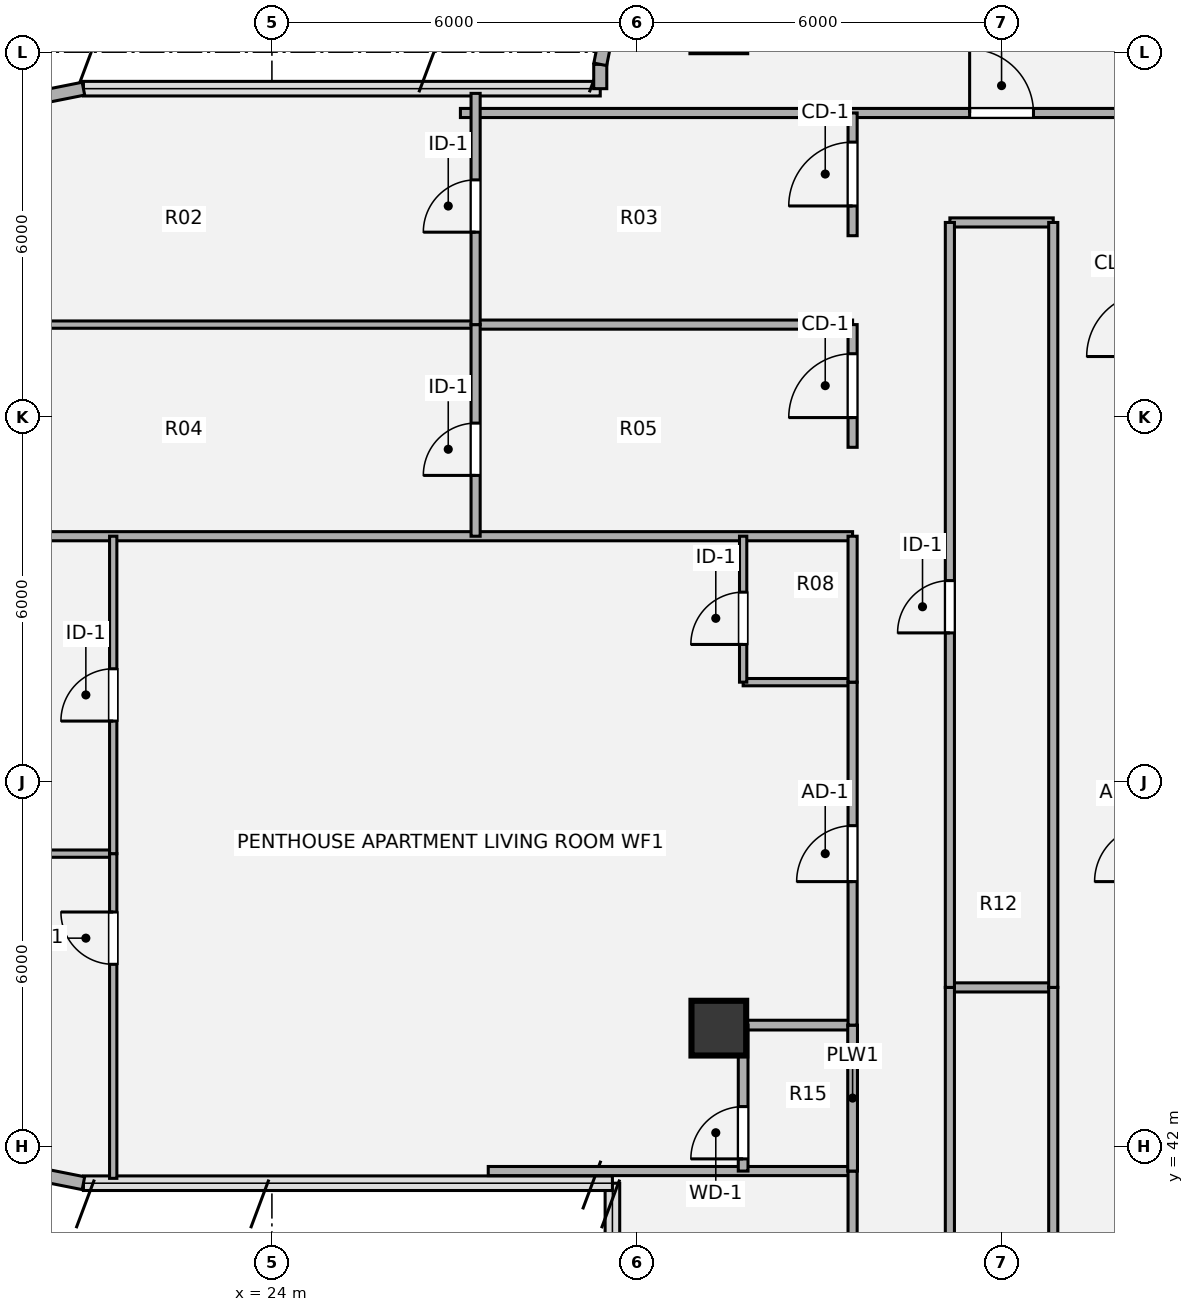
"""IFC4 building model, lengths in metres.
Left out: names, types, materials, properties, quantities, classifications, styles, units other than length and angle.
Written with IfcOpenShell. Run it as: python <this file> out.ifc"""

import sys

from ifc_helpers import new_model, si_unit, direction, frame, frame_2d, origin, origin_2d, place, context, subcontext, project, spatial, rectangle, hollow_circle, extrude, source, transform, mapped, element, fill, save


model = new_model("IFC4")
c1 = context("Model", 3, precision=1e-05, world=origin(), true_north=direction((0.0, 1.0)))
c2 = subcontext(c1, "Body", "Model", "MODEL_VIEW")
j1 = project(units=[si_unit("LENGTHUNIT", "METRE"), si_unit("PLANEANGLEUNIT", "RADIAN")], contexts=[c1])
p1 = place(None, origin())
s1 = spatial("IfcSite", under=j1, at=p1, CompositionType="ELEMENT")
p2 = place(p1, origin())
s2 = spatial("IfcBuilding", under=s1, at=p2, CompositionType="ELEMENT")
p3 = place(p2, frame((0.0, 0.0, 272.16)))
s3 = spatial("IfcBuildingStorey", under=s2, at=p3, CompositionType="ELEMENT", Elevation=272.16)
m1 = source(origin(), c2, "Body", "SweptSolid", [
    extrude(hollow_circle(Radius=0.45, WallThickness=0.032, at=origin_2d()), origin(), (0.0, 0.0, 1.0), 3.78),
])
p4 = place(p3, frame((31.35, 43.95, 0.0), z_axis=(0.0, 0.0, 1.0), x_axis=(1.0, 0.0, 0.0)))
e1 = element("IfcColumn", 1, at=p4, inside=s3, PredefinedType="COLUMN", context=c2, shape_type="MappedRepresentation", body=[
    mapped(m1, transform((0.0, 0.0, 0.0), x_axis=(1.0, 0.0, 0.0), y_axis=(0.0, 1.0, 0.0), z_axis=(0.0, 0.0, 1.0), scale=1.0)),
])
for number, where, z_axis, x_axis in (
    (2, (20.9, 41.4, 0.0), (0.0, 0.0, 1.0), (-0.981, 0.195, 0.0)),
    (3, (19.675, 59.156, 0.0), (0.0, 0.0, 1.0), (0.981, 0.195, 0.0)),
):
    element("IfcWall", number, at=place(p3, frame(where, z_axis=z_axis, x_axis=x_axis)), inside=s3, PredefinedType="SOLIDWALL", context=c2, shape_type="SweptSolid", body=[
        extrude(rectangle(XDim=1.249, YDim=0.215, at=frame_2d((0.624, 0.0))), origin(), (0.0, 0.0, 1.0), 3.53),
    ])
p5 = place(p3, frame((29.4, 59.4, 0.0), z_axis=(0.0, 0.0, 1.0), x_axis=(0.0, 1.0, 0.0)))
e4 = element("IfcWall", 4, at=p5, inside=s3, PredefinedType="SOLIDWALL", context=c2, shape_type="SweptSolid", body=[
    extrude(rectangle(XDim=0.4, YDim=0.215, at=frame_2d((0.2, 0.0))), origin(), (0.0, 0.0, 1.0), 3.53),
])
p6 = place(p3, frame((29.4, 59.8, 0.0), z_axis=(0.0, 0.0, 1.0), x_axis=(0.195190360752, 0.980765376158, 0.0)))
e5 = element("IfcWall", 5, at=p6, inside=s3, PredefinedType="SOLIDWALL", context=c2, shape_type="SweptSolid", body=[
    extrude(rectangle(XDim=1.014, YDim=0.215, at=frame_2d((0.507, 0.0))), origin(), (0.0, 0.0, 1.0), 3.53),
])
p7 = place(p3, frame((27.558, 41.6, 0.0), z_axis=(0.0, 0.0, 1.0), x_axis=(1.0, 0.0, 0.0)))
e6 = element("IfcWall", 6, at=p7, inside=s3, PredefinedType="PARTITIONING", context=c2, shape_type="SweptSolid", body=[
    extrude(rectangle(XDim=5.992, YDim=0.15, at=frame_2d((2.996, 0.0))), origin(), (0.0, 0.0, 1.0), 3.5),
])
p8 = place(p3, frame((31.75, 44.0, 0.0), z_axis=(0.0, 0.0, 1.0), x_axis=(1.0, 0.0, 0.0)))
e7 = element("IfcWall", 7, at=p8, inside=s3, PredefinedType="PLUMBINGWALL", context=c2, shape_type="SweptSolid", body=[
    extrude(rectangle(XDim=1.8, YDim=0.16, at=frame_2d((0.9, 0.0))), origin(), (0.0, 0.0, 1.0), 2.903),
])
p9 = place(p3, frame((35.15, 44.62, 0.0), z_axis=(0.0, 0.0, 1.0), x_axis=(1.0, 0.0, 0.0)))
e8 = element("IfcWall", 8, at=p9, inside=s3, PredefinedType="PARTITIONING", context=c2, shape_type="SweptSolid", body=[
    extrude(rectangle(XDim=1.7, YDim=0.15, at=frame_2d((0.85, 0.0))), origin(), (0.0, 0.0, 1.0), 3.259),
])
p10 = place(p3, frame((17.78, 46.82, 0.0), z_axis=(0.0, 0.0, 1.0), x_axis=(1.0, 0.0, 0.0)))
e9 = element("IfcWall", 9, at=p10, inside=s3, PredefinedType="PARTITIONING", context=c2, shape_type="SweptSolid", body=[
    extrude(rectangle(XDim=3.61, YDim=0.12, at=frame_2d((1.805, 0.0))), origin(), (0.0, 0.0, 1.0), 2.982),
])
p11 = place(p3, frame((31.75, 49.64, 0.0), z_axis=(0.0, 0.0, 1.0), x_axis=(1.0, 0.0, 0.0)))
e10 = element("IfcWall", 10, at=p11, inside=s3, PredefinedType="PARTITIONING", context=c2, shape_type="SweptSolid", body=[
    extrude(rectangle(XDim=1.8, YDim=0.12, at=frame_2d((0.9, 0.0))), origin(), (0.0, 0.0, 1.0), 3.259),
])
p12 = place(p3, frame((17.78, 52.04, 0.0), z_axis=(0.0, 0.0, 1.0), x_axis=(1.0, 0.0, 0.0)))
e11 = element("IfcWall", 11, at=p12, inside=s3, PredefinedType="PARTITIONING", context=c2, shape_type="SweptSolid", body=[
    extrude(rectangle(XDim=15.77, YDim=0.15, at=frame_2d((7.885, 0.0))), origin(), (0.0, 0.0, 1.0), 2.982),
])
p13 = place(p3, frame((17.78, 55.52, 0.0), z_axis=(0.0, 0.0, 1.0), x_axis=(1.0, 0.0, 0.0)))
e12 = element("IfcWall", 12, at=p13, inside=s3, PredefinedType="PARTITIONING", context=c2, shape_type="SweptSolid", body=[
    extrude(rectangle(XDim=9.57, YDim=0.12, at=frame_2d((4.785, 0.0))), origin(), (0.0, 0.0, 1.0), 3.5),
])
p14 = place(p3, frame((27.35, 55.52, 0.0), z_axis=(0.0, 0.0, 1.0), x_axis=(1.0, 0.0, 0.0)))
e13 = element("IfcWall", 13, at=p14, inside=s3, PredefinedType="PARTITIONING", context=c2, shape_type="SweptSolid", body=[
    extrude(rectangle(XDim=6.2, YDim=0.15, at=frame_2d((3.1, 0.0))), origin(), (0.0, 0.0, 1.0), 3.259),
])
p15 = place(p3, frame((35.15, 57.2, 0.0), z_axis=(0.0, 0.0, 1.0), x_axis=(1.0, 0.0, 0.0)))
e14 = element("IfcWall", 14, at=p15, inside=s3, PredefinedType="PARTITIONING", context=c2, shape_type="SweptSolid", body=[
    extrude(rectangle(XDim=1.7, YDim=0.15, at=frame_2d((0.85, 0.0))), origin(), (0.0, 0.0, 1.0), 3.308),
])
p16 = place(p3, frame((27.1, 59.0, 0.0), z_axis=(0.0, 0.0, 1.0), x_axis=(1.0, 0.0, 0.0)))
e15 = element("IfcWall", 15, at=p16, inside=s3, PredefinedType="PARTITIONING", context=c2, shape_type="SweptSolid", body=[
    extrude(rectangle(XDim=17.8, YDim=0.15, at=frame_2d((8.9, 0.0))), origin(), (0.0, 0.0, 1.0), 3.308),
])
p17 = place(p16, frame((8.375, 0.0, 0.0)))
e16 = element("IfcOpeningElement", 16, at=p17, cuts=e15, PredefinedType="OPENING", context=c2, shape_type="SweptSolid", body=[
    extrude(rectangle(XDim=1.05, YDim=2.1, at=origin_2d()), frame((0.525, 0.085, 1.05), z_axis=(0.0, -1.0, 0.0), x_axis=(1.0, 0.0, 0.0)), (0.0, 0.0, 1.0), 0.17),
])
p18 = place(p3, frame((21.39, 41.48, 0.0), z_axis=(0.0, 0.0, 1.0), x_axis=(0.0, 1.0, 0.0)))
e17 = element("IfcWall", 17, at=p18, inside=s3, PredefinedType="PARTITIONING", context=c2, shape_type="SweptSolid", body=[
    extrude(rectangle(XDim=5.34, YDim=0.12, at=frame_2d((2.67, 0.0))), origin(), (0.0, 0.0, 1.0), 3.5),
])
p19 = place(p18, frame((3.52, 0.0, 0.0)))
e18 = element("IfcOpeningElement", 18, at=p19, cuts=e17, PredefinedType="OPENING", context=c2, shape_type="SweptSolid", body=[
    extrude(rectangle(XDim=0.86, YDim=2.1, at=origin_2d()), frame((0.43, 0.07, 1.05), z_axis=(0.0, -1.0, 0.0), x_axis=(1.0, 0.0, 0.0)), (0.0, 0.0, 1.0), 0.14),
])
p20 = place(p3, frame((21.39, 46.82, 0.0), z_axis=(0.0, 0.0, 1.0), x_axis=(0.0, 1.0, 0.0)))
e19 = element("IfcWall", 19, at=p20, inside=s3, PredefinedType="PARTITIONING", context=c2, shape_type="SweptSolid", body=[
    extrude(rectangle(XDim=5.22, YDim=0.12, at=frame_2d((2.61, 0.0))), origin(), (0.0, 0.0, 1.0), 3.5),
])
p21 = place(p20, frame((2.18, 0.0, 0.0)))
e20 = element("IfcOpeningElement", 20, at=p21, cuts=e19, PredefinedType="OPENING", context=c2, shape_type="SweptSolid", body=[
    extrude(rectangle(XDim=0.86, YDim=2.1, at=origin_2d()), frame((0.43, 0.07, 1.05), z_axis=(0.0, -1.0, 0.0), x_axis=(1.0, 0.0, 0.0)), (0.0, 0.0, 1.0), 0.14),
])
p22 = place(p3, frame((27.35, 52.04, 0.0), z_axis=(0.0, 0.0, 1.0), x_axis=(0.0, 1.0, 0.0)))
e21 = element("IfcWall", 21, at=p22, inside=s3, PredefinedType="PARTITIONING", context=c2, shape_type="SweptSolid", body=[
    extrude(rectangle(XDim=3.48, YDim=0.15, at=frame_2d((1.74, 0.0))), origin(), (0.0, 0.0, 1.0), 3.5),
])
p23 = place(p22, frame((1.0, 0.0, 0.0)))
e22 = element("IfcOpeningElement", 22, at=p23, cuts=e21, PredefinedType="OPENING", context=c2, shape_type="SweptSolid", body=[
    extrude(rectangle(XDim=0.86, YDim=2.1, at=origin_2d()), frame((0.43, 0.085, 1.05), z_axis=(0.0, -1.0, 0.0), x_axis=(1.0, 0.0, 0.0)), (0.0, 0.0, 1.0), 0.17),
])
p24 = place(p3, frame((27.35, 55.52, 0.0), z_axis=(0.0, 0.0, 1.0), x_axis=(0.0, 1.0, 0.0)))
e23 = element("IfcWall", 23, at=p24, inside=s3, PredefinedType="PARTITIONING", context=c2, shape_type="SweptSolid", body=[
    extrude(rectangle(XDim=3.802, YDim=0.15, at=frame_2d((1.901, 0.0))), origin(), (0.0, 0.0, 1.0), 3.5),
])
p25 = place(p24, frame((1.52, 0.0, 0.0)))
e24 = element("IfcOpeningElement", 24, at=p25, cuts=e23, PredefinedType="OPENING", context=c2, shape_type="SweptSolid", body=[
    extrude(rectangle(XDim=0.86, YDim=2.1, at=origin_2d()), frame((0.43, 0.085, 1.05), z_axis=(0.0, -1.0, 0.0), x_axis=(1.0, 0.0, 0.0)), (0.0, 0.0, 1.0), 0.17),
])
p26 = place(p3, frame((31.75, 41.6, 0.0), z_axis=(0.0, 0.0, 1.0), x_axis=(0.0, 1.0, 0.0)))
e25 = element("IfcWall", 25, at=p26, inside=s3, PredefinedType="PLUMBINGWALL", context=c2, shape_type="SweptSolid", body=[
    extrude(rectangle(XDim=2.4, YDim=0.16, at=frame_2d((1.2, 0.0))), origin(), (0.0, 0.0, 1.0), 3.5),
])
p27 = place(p26, frame((0.2, 0.0, 0.0)))
e26 = element("IfcOpeningElement", 26, at=p27, cuts=e25, PredefinedType="OPENING", context=c2, shape_type="SweptSolid", body=[
    extrude(rectangle(XDim=0.86, YDim=2.1, at=origin_2d()), frame((0.43, 0.09, 1.05), z_axis=(0.0, -1.0, 0.0), x_axis=(1.0, 0.0, 0.0)), (0.0, 0.0, 1.0), 0.18),
])
p28 = place(p3, frame((31.75, 49.64, 0.0), z_axis=(0.0, 0.0, 1.0), x_axis=(0.0, 1.0, 0.0)))
e27 = element("IfcWall", 27, at=p28, inside=s3, PredefinedType="PARTITIONING", context=c2, shape_type="SweptSolid", body=[
    extrude(rectangle(XDim=2.4, YDim=0.12, at=frame_2d((1.2, 0.0))), origin(), (0.0, 0.0, 1.0), 3.5),
])
p29 = place(p28, frame((0.62, 0.0, 0.0)))
e28 = element("IfcOpeningElement", 28, at=p29, cuts=e27, PredefinedType="OPENING", context=c2, shape_type="SweptSolid", body=[
    extrude(rectangle(XDim=0.86, YDim=2.1, at=origin_2d()), frame((0.43, 0.07, 1.05), z_axis=(0.0, -1.0, 0.0), x_axis=(1.0, 0.0, 0.0)), (0.0, 0.0, 1.0), 0.14),
])
p30 = place(p3, frame((33.55, 22.8, 0.0), z_axis=(0.0, 0.0, 1.0), x_axis=(0.0, 1.0, 0.0)))
e29 = element("IfcWall", 29, at=p30, inside=s3, PredefinedType="PARTITIONING", context=c2, shape_type="SweptSolid", body=[
    extrude(rectangle(XDim=18.8, YDim=0.15, at=frame_2d((9.4, 0.0))), origin(), (0.0, 0.0, 1.0), 3.5),
])
p31 = place(p30, frame((8.84, 0.0, 0.0)))
e30 = element("IfcOpeningElement", 30, at=p31, cuts=e29, PredefinedType="OPENING", context=c2, shape_type="SweptSolid", body=[
    extrude(rectangle(XDim=0.86, YDim=2.1, at=origin_2d()), frame((0.43, 0.085, 1.05), z_axis=(0.0, -1.0, 0.0), x_axis=(1.0, 0.0, 0.0)), (0.0, 0.0, 1.0), 0.17),
])
p32 = place(p3, frame((33.55, 41.6, 0.0), z_axis=(0.0, 0.0, 1.0), x_axis=(0.0, 1.0, 0.0)))
e31 = element("IfcWall", 31, at=p32, inside=s3, PredefinedType="PLUMBINGWALL", context=c2, shape_type="SweptSolid", body=[
    extrude(rectangle(XDim=2.4, YDim=0.16, at=frame_2d((1.2, 0.0))), origin(), (0.0, 0.0, 1.0), 3.5),
])
p33 = place(p3, frame((33.55, 44.0, 0.0), z_axis=(0.0, 0.0, 1.0), x_axis=(0.0, 1.0, 0.0)))
e32 = element("IfcWall", 32, at=p33, inside=s3, PredefinedType="PARTITIONING", context=c2, shape_type="SweptSolid", body=[
    extrude(rectangle(XDim=5.64, YDim=0.15, at=frame_2d((2.82, 0.0))), origin(), (0.0, 0.0, 1.0), 3.5),
])
p34 = place(p33, frame((2.36, 0.0, 0.0)))
e33 = element("IfcOpeningElement", 33, at=p34, cuts=e32, PredefinedType="OPENING", context=c2, shape_type="SweptSolid", body=[
    extrude(rectangle(XDim=0.92, YDim=2.1, at=origin_2d()), frame((0.46, 0.085, 1.05), z_axis=(0.0, -1.0, 0.0), x_axis=(1.0, 0.0, 0.0)), (0.0, 0.0, 1.0), 0.17),
])
p35 = place(p3, frame((33.55, 49.64, 0.0), z_axis=(0.0, 0.0, 1.0), x_axis=(0.0, 1.0, 0.0)))
e34 = element("IfcWall", 34, at=p35, inside=s3, PredefinedType="PARTITIONING", context=c2, shape_type="SweptSolid", body=[
    extrude(rectangle(XDim=2.4, YDim=0.15, at=frame_2d((1.2, 0.0))), origin(), (0.0, 0.0, 1.0), 3.5),
])
p36 = place(p3, frame((33.55, 53.502, 0.0), z_axis=(0.0, 0.0, 1.0), x_axis=(0.0, 1.0, 0.0)))
e35 = element("IfcWall", 35, at=p36, inside=s3, PredefinedType="PARTITIONING", context=c2, shape_type="SweptSolid", body=[
    extrude(rectangle(XDim=2.018, YDim=0.15, at=frame_2d((1.009, 0.0))), origin(), (0.0, 0.0, 1.0), 3.5),
])
p37 = place(p36, frame((0.489, 0.0, 0.0)))
e36 = element("IfcOpeningElement", 36, at=p37, cuts=e35, PredefinedType="OPENING", context=c2, shape_type="SweptSolid", body=[
    extrude(rectangle(XDim=1.05, YDim=2.1, at=origin_2d()), frame((0.525, 0.085, 1.05), z_axis=(0.0, -1.0, 0.0), x_axis=(1.0, 0.0, 0.0)), (0.0, 0.0, 1.0), 0.17),
])
p38 = place(p3, frame((33.55, 56.982, 0.0), z_axis=(0.0, 0.0, 1.0), x_axis=(0.0, 1.0, 0.0)))
e37 = element("IfcWall", 37, at=p38, inside=s3, PredefinedType="PARTITIONING", context=c2, shape_type="SweptSolid", body=[
    extrude(rectangle(XDim=2.018, YDim=0.15, at=frame_2d((1.009, 0.0))), origin(), (0.0, 0.0, 1.0), 3.5),
])
p39 = place(p38, frame((0.489, 0.0, 0.0)))
e38 = element("IfcOpeningElement", 38, at=p39, cuts=e37, PredefinedType="OPENING", context=c2, shape_type="SweptSolid", body=[
    extrude(rectangle(XDim=1.05, YDim=2.1, at=origin_2d()), frame((0.525, 0.085, 1.05), z_axis=(0.0, -1.0, 0.0), x_axis=(1.0, 0.0, 0.0)), (0.0, 0.0, 1.0), 0.17),
])
p40 = place(p3, frame((35.15, 25.2, 0.0), z_axis=(0.0, 0.0, 1.0), x_axis=(0.0, 1.0, 0.0)))
e39 = element("IfcWall", 39, at=p40, inside=s3, PredefinedType="PARTITIONING", context=c2, shape_type="SweptSolid", body=[
    extrude(rectangle(XDim=19.42, YDim=0.15, at=frame_2d((9.71, 0.0))), origin(), (0.0, 0.0, 1.0), 3.5),
])
p41 = place(p3, frame((35.15, 44.62, 0.0), z_axis=(0.0, 0.0, 1.0), x_axis=(0.0, 1.0, 0.0)))
e40 = element("IfcWall", 40, at=p41, inside=s3, PredefinedType="PARTITIONING", context=c2, shape_type="SweptSolid", body=[
    extrude(rectangle(XDim=12.58, YDim=0.15, at=frame_2d((6.29, 0.0))), origin(), (0.0, 0.0, 1.0), 3.5),
])
p42 = place(p41, frame((5.83, 0.0, 0.0)))
e41 = element("IfcOpeningElement", 41, at=p42, cuts=e40, PredefinedType="OPENING", context=c2, shape_type="SweptSolid", body=[
    extrude(rectangle(XDim=0.86, YDim=2.1, at=origin_2d()), frame((0.43, 0.085, 1.05), z_axis=(0.0, -1.0, 0.0), x_axis=(1.0, 0.0, 0.0)), (0.0, 0.0, 1.0), 0.17),
])
p43 = place(p3, frame((36.85, 25.2, 0.0), z_axis=(0.0, 0.0, 1.0), x_axis=(0.0, 1.0, 0.0)))
e42 = element("IfcWall", 42, at=p43, inside=s3, PredefinedType="PARTITIONING", context=c2, shape_type="SweptSolid", body=[
    extrude(rectangle(XDim=19.42, YDim=0.15, at=frame_2d((9.71, 0.0))), origin(), (0.0, 0.0, 1.0), 3.5),
])
p44 = place(p43, frame((9.185, 0.0, 0.0)))
e43 = element("IfcOpeningElement", 43, at=p44, cuts=e42, PredefinedType="OPENING", context=c2, shape_type="SweptSolid", body=[
    extrude(rectangle(XDim=1.05, YDim=2.1, at=origin_2d()), frame((0.525, 0.085, 1.05), z_axis=(0.0, -1.0, 0.0), x_axis=(1.0, 0.0, 0.0)), (0.0, 0.0, 1.0), 0.17),
])
p45 = place(p3, frame((36.85, 44.62, 0.0), z_axis=(0.0, 0.0, 1.0), x_axis=(0.0, 1.0, 0.0)))
e44 = element("IfcWall", 44, at=p45, inside=s3, PredefinedType="PARTITIONING", context=c2, shape_type="SweptSolid", body=[
    extrude(rectangle(XDim=12.58, YDim=0.15, at=frame_2d((6.29, 0.0))), origin(), (0.0, 0.0, 1.0), 3.5),
])
m2 = source(origin(), c2, "Body", "SweptSolid", [
    extrude(rectangle(XDim=1.05, YDim=2.1, at=origin_2d()), frame((0.525, 0.025, 1.05), z_axis=(0.0, -1.0, 0.0), x_axis=(1.0, 0.0, 0.0)), (0.0, 0.0, 1.0), 0.05),
])
p46 = place(p17, origin())
e45 = element("IfcDoor", 45, at=p46, inside=s3, OperationType="SINGLE_SWING_LEFT", PredefinedType="DOOR", context=c2, shape_type="MappedRepresentation", body=[
    mapped(m2, transform((0.0, 0.0, 0.0), x_axis=(1.0, 0.0, 0.0), y_axis=(0.0, 1.0, 0.0), z_axis=(0.0, 0.0, 1.0), scale=1.0)),
])
fill(e16, e45)
m3 = source(origin(), c2, "Body", "SweptSolid", [
    extrude(rectangle(XDim=0.86, YDim=2.1, at=origin_2d()), frame((0.43, 0.025, 1.05), z_axis=(0.0, -1.0, 0.0), x_axis=(1.0, 0.0, 0.0)), (0.0, 0.0, 1.0), 0.05),
])
p47 = place(p19, origin())
e46 = element("IfcDoor", 46, at=p47, inside=s3, OperationType="SINGLE_SWING_RIGHT", PredefinedType="DOOR", context=c2, shape_type="MappedRepresentation", body=[
    mapped(m3, transform((0.0, 0.0, 0.0), x_axis=(1.0, 0.0, 0.0), y_axis=(0.0, 1.0, 0.0), z_axis=(0.0, 0.0, 1.0), scale=1.0)),
])
fill(e18, e46)
p48 = place(p21, origin())
e47 = element("IfcDoor", 47, at=p48, inside=s3, OperationType="SINGLE_SWING_LEFT", PredefinedType="DOOR", context=c2, shape_type="MappedRepresentation", body=[
    mapped(m3, transform((0.0, 0.0, 0.0), x_axis=(1.0, 0.0, 0.0), y_axis=(0.0, 1.0, 0.0), z_axis=(0.0, 0.0, 1.0), scale=1.0)),
])
fill(e20, e47)
p49 = place(p23, origin())
e48 = element("IfcDoor", 48, at=p49, inside=s3, OperationType="SINGLE_SWING_LEFT", PredefinedType="DOOR", context=c2, shape_type="MappedRepresentation", body=[
    mapped(m3, transform((0.0, 0.0, 0.0), x_axis=(1.0, 0.0, 0.0), y_axis=(0.0, 1.0, 0.0), z_axis=(0.0, 0.0, 1.0), scale=1.0)),
])
fill(e22, e48)
p50 = place(p25, origin())
e49 = element("IfcDoor", 49, at=p50, inside=s3, OperationType="SINGLE_SWING_LEFT", PredefinedType="DOOR", context=c2, shape_type="MappedRepresentation", body=[
    mapped(m3, transform((0.0, 0.0, 0.0), x_axis=(1.0, 0.0, 0.0), y_axis=(0.0, 1.0, 0.0), z_axis=(0.0, 0.0, 1.0), scale=1.0)),
])
fill(e24, e49)
m4 = source(origin(), c2, "Body", "SweptSolid", [
    extrude(rectangle(XDim=0.86, YDim=2.1, at=origin_2d()), frame((0.43, 0.025, 1.05), z_axis=(0.0, -1.0, 0.0), x_axis=(1.0, 0.0, 0.0)), (0.0, 0.0, 1.0), 0.05),
])
p51 = place(p27, origin())
e50 = element("IfcDoor", 50, at=p51, inside=s3, OperationType="SINGLE_SWING_LEFT", PredefinedType="DOOR", context=c2, shape_type="MappedRepresentation", body=[
    mapped(m4, transform((0.0, 0.0, 0.0), x_axis=(1.0, 0.0, 0.0), y_axis=(0.0, 1.0, 0.0), z_axis=(0.0, 0.0, 1.0), scale=1.0)),
])
fill(e26, e50)
p52 = place(p29, origin())
e51 = element("IfcDoor", 51, at=p52, inside=s3, OperationType="SINGLE_SWING_LEFT", PredefinedType="DOOR", context=c2, shape_type="MappedRepresentation", body=[
    mapped(m3, transform((0.0, 0.0, 0.0), x_axis=(1.0, 0.0, 0.0), y_axis=(0.0, 1.0, 0.0), z_axis=(0.0, 0.0, 1.0), scale=1.0)),
])
fill(e28, e51)
m5 = source(origin(), c2, "Body", "SweptSolid", [
    extrude(rectangle(XDim=0.92, YDim=2.1, at=origin_2d()), frame((0.46, 0.025, 1.05), z_axis=(0.0, -1.0, 0.0), x_axis=(1.0, 0.0, 0.0)), (0.0, 0.0, 1.0), 0.05),
])
p53 = place(p34, origin())
e52 = element("IfcDoor", 52, at=p53, inside=s3, OperationType="SINGLE_SWING_LEFT", PredefinedType="DOOR", context=c2, shape_type="MappedRepresentation", body=[
    mapped(m5, transform((0.0, 0.0, 0.0), x_axis=(1.0, 0.0, 0.0), y_axis=(0.0, 1.0, 0.0), z_axis=(0.0, 0.0, 1.0), scale=1.0)),
])
fill(e33, e52)
m6 = source(origin(), c2, "Body", "SweptSolid", [
    extrude(rectangle(XDim=1.05, YDim=2.1, at=origin_2d()), frame((0.525, 0.025, 1.05), z_axis=(0.0, -1.0, 0.0), x_axis=(1.0, 0.0, 0.0)), (0.0, 0.0, 1.0), 0.05),
])
p54 = place(p37, origin())
e53 = element("IfcDoor", 53, at=p54, inside=s3, OperationType="SINGLE_SWING_LEFT", PredefinedType="DOOR", context=c2, shape_type="MappedRepresentation", body=[
    mapped(m6, transform((0.0, 0.0, 0.0), x_axis=(1.0, 0.0, 0.0), y_axis=(0.0, 1.0, 0.0), z_axis=(0.0, 0.0, 1.0), scale=1.0)),
])
fill(e36, e53)
p55 = place(p39, origin())
e54 = element("IfcDoor", 54, at=p55, inside=s3, OperationType="SINGLE_SWING_LEFT", PredefinedType="DOOR", context=c2, shape_type="MappedRepresentation", body=[
    mapped(m6, transform((0.0, 0.0, 0.0), x_axis=(1.0, 0.0, 0.0), y_axis=(0.0, 1.0, 0.0), z_axis=(0.0, 0.0, 1.0), scale=1.0)),
])
fill(e38, e54)
p56 = place(p42, origin())
e55 = element("IfcDoor", 55, at=p56, inside=s3, OperationType="SINGLE_SWING_LEFT", PredefinedType="DOOR", context=c2, shape_type="MappedRepresentation", body=[
    mapped(m3, transform((0.0, 0.0, 0.0), x_axis=(1.0, 0.0, 0.0), y_axis=(0.0, 1.0, 0.0), z_axis=(0.0, 0.0, 1.0), scale=1.0)),
])
fill(e41, e55)
save(model, sys.argv[1])
